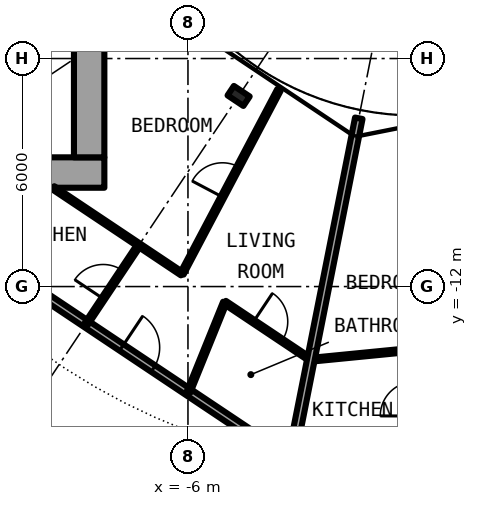
"""IFC4 building model, lengths in metres.
Left out: names, types, materials, properties, quantities, classifications, styles, units other than length and angle.
Written with IfcOpenShell. Run it as: python <this file> out.ifc"""

import sys

from ifc_helpers import new_model, si_unit, direction, frame, frame_2d, origin, origin_2d, place, context, subcontext, project, spatial, rectangle, i_section, extrude, element, fill, save


model = new_model("IFC4")
c1 = context("Model", 3, precision=1e-05, world=origin(), true_north=direction((0.0, 1.0)))
c2 = subcontext(c1, "Body", "Model", "MODEL_VIEW")
j1 = project(units=[si_unit("LENGTHUNIT", "METRE"), si_unit("PLANEANGLEUNIT", "RADIAN")], contexts=[c1])
p1 = place(None, origin())
s1 = spatial("IfcSite", under=j1, at=p1, CompositionType="ELEMENT")
p2 = place(p1, origin())
s2 = spatial("IfcBuilding", under=s1, at=p2, CompositionType="ELEMENT")
p3 = place(p2, frame((0.0, 0.0, 35.0)))
s3 = spatial("IfcBuildingStorey", under=s2, at=p3, CompositionType="ELEMENT", Elevation=35.0)
p4 = place(p3, frame((-4.667, -6.984, 0.0), z_axis=(0.0, 0.0, 1.0), x_axis=(-0.55557023302, -0.831469612303, 0.0)))
e1 = element("IfcColumn", 1, at=p4, inside=s3, PredefinedType="COLUMN", context=c2, shape_type="SweptSolid", body=[
    extrude(i_section(OverallWidth=0.3, OverallDepth=0.5, WebThickness=0.014, FlangeThickness=0.028, FilletRadius=0.027, at=origin_2d()), origin(), (0.0, 0.0, 1.0), 3.05),
])
p5 = place(p3, frame((-22.4, -9.0, 0.0), z_axis=(0.0, 0.0, 1.0), x_axis=(1.0, 0.0, 0.0)))
e2 = element("IfcWall", 2, at=p5, inside=s3, PredefinedType="SHEAR", context=c2, shape_type="SweptSolid", body=[
    extrude(rectangle(XDim=14.2, YDim=0.8, at=frame_2d((7.1, 0.0))), origin(), (0.0, 0.0, 1.0), 3.05),
])
p6 = place(p5, frame((1.325, 0.0, 0.0)))
e3 = element("IfcOpeningElement", 3, at=p6, cuts=e2, PredefinedType="OPENING", context=c2, shape_type="SweptSolid", body=[
    extrude(rectangle(XDim=1.2, YDim=2.3, at=frame_2d((0.6, 1.15))), frame((0.0, 0.41, 0.0), z_axis=(0.0, -1.0, 0.0), x_axis=(1.0, 0.0, 0.0)), (0.0, 0.0, 1.0), 0.82),
])
p7 = place(p3, frame((-8.6, 8.6, 0.0), z_axis=(0.0, 0.0, 1.0), x_axis=(0.0, -1.0, 0.0)))
e4 = element("IfcWall", 4, at=p7, inside=s3, PredefinedType="SHEAR", context=c2, shape_type="SweptSolid", body=[
    extrude(rectangle(XDim=17.2, YDim=0.8, at=frame_2d((8.6, 0.0))), origin(), (0.0, 0.0, 1.0), 3.05),
])
p8 = place(p7, frame((7.4, 0.0, 0.1)))
e5 = element("IfcOpeningElement", 5, at=p8, cuts=e4, PredefinedType="OPENING", context=c2, shape_type="SweptSolid", body=[
    extrude(rectangle(XDim=2.4, YDim=2.2, at=frame_2d((1.2, 1.1))), frame((0.0, 0.41, 0.0), z_axis=(0.0, -1.0, 0.0), x_axis=(1.0, 0.0, 0.0)), (0.0, 0.0, 1.0), 0.82),
])
p9 = place(p3, frame((-16.173, -10.99, 0.0), z_axis=(0.0, 0.0, 1.0), x_axis=(0.772704887747, -0.634765434198, 0.0)))
e6 = element("IfcWall", 6, at=p9, inside=s3, PredefinedType="PARTITIONING", context=c2, shape_type="SweptSolid", body=[
    extrude(rectangle(XDim=11.209, YDim=0.2, at=frame_2d((5.604, 0.0))), origin(), (0.0, 0.0, 1.0), 2.38),
])
p10 = place(p9, frame((3.137, 0.0, 0.0)))
e7 = element("IfcOpeningElement", 7, at=p10, cuts=e6, PredefinedType="OPENING", context=c2, shape_type="SweptSolid", body=[
    extrude(rectangle(XDim=1.0, YDim=2.3, at=frame_2d((0.5, 1.15))), frame((0.0, 0.11, 0.0), z_axis=(0.0, -1.0, 0.0), x_axis=(1.0, 0.0, 0.0)), (0.0, 0.0, 1.0), 0.22),
])
p11 = place(p3, frame((-3.297, -16.575, 0.0), z_axis=(0.0, 0.0, 1.0), x_axis=(0.995201860711, 0.097843019361, 0.0)))
e8 = element("IfcWall", 8, at=p11, inside=s3, PredefinedType="PARTITIONING", context=c2, shape_type="SweptSolid", body=[
    extrude(rectangle(XDim=9.811, YDim=0.2, at=frame_2d((4.906, 0.0))), origin(), (0.0, 0.0, 1.0), 2.7),
])
p12 = place(p11, frame((4.406, 0.0, 0.0)))
e9 = element("IfcOpeningElement", 9, at=p12, cuts=e8, PredefinedType="OPENING", context=c2, shape_type="SweptSolid", body=[
    extrude(rectangle(XDim=1.0, YDim=2.3, at=frame_2d((0.5, 1.15))), frame((0.0, 0.11, 0.0), z_axis=(0.0, -1.0, 0.0), x_axis=(1.0, 0.0, 0.0)), (0.0, 0.0, 1.0), 0.22),
])
p13 = place(p3, frame((-14.036, -9.402, 0.0), z_axis=(0.0, 0.0, 1.0), x_axis=(0.831561346449, -0.555432918625, 0.0)))
e10 = element("IfcWall", 10, at=p13, inside=s3, PredefinedType="PARTITIONING", context=c2, shape_type="SweptSolid", body=[
    extrude(rectangle(XDim=12.914, YDim=0.2, at=frame_2d((6.457, 0.0))), origin(), (0.0, 0.0, 1.0), 2.7),
])
p14 = place(p13, frame((7.566, 0.0, 0.0)))
e11 = element("IfcOpeningElement", 11, at=p14, cuts=e10, PredefinedType="OPENING", context=c2, shape_type="SweptSolid", body=[
    extrude(rectangle(XDim=1.0, YDim=2.3, at=frame_2d((0.5, 1.15))), frame((0.0, 0.11, 0.0), z_axis=(0.0, -1.0, 0.0), x_axis=(1.0, 0.0, 0.0)), (0.0, 0.0, 1.0), 0.22),
])
p15 = place(p3, frame((-2.772, -13.927, 0.0), z_axis=(0.0, 0.0, 1.0), x_axis=(0.995206960104, 0.097791137432, 0.0)))
e12 = element("IfcWall", 12, at=p15, inside=s3, PredefinedType="PARTITIONING", context=c2, shape_type="SweptSolid", body=[
    extrude(rectangle(XDim=4.122, YDim=0.1, at=frame_2d((2.061, 0.0))), origin(), (0.0, 0.0, 1.0), 2.7),
])
p16 = place(p3, frame((-9.545, -9.401, 0.0), z_axis=(0.0, 0.0, 1.0), x_axis=(0.831459707426, -0.555585056429, 0.0)))
e13 = element("IfcWall", 13, at=p16, inside=s3, PredefinedType="PARTITIONING", context=c2, shape_type="SweptSolid", body=[
    extrude(rectangle(XDim=4.073, YDim=0.1, at=frame_2d((2.037, 0.0))), origin(), (0.0, 0.0, 1.0), 2.7),
])
p17 = place(p3, frame((-5.029, -12.418, 0.0), z_axis=(0.0, 0.0, 1.0), x_axis=(0.831538390496, -0.555467285384, 0.0)))
e14 = element("IfcWall", 14, at=p17, inside=s3, PredefinedType="PARTITIONING", context=c2, shape_type="SweptSolid", body=[
    extrude(rectangle(XDim=2.717, YDim=0.1, at=frame_2d((1.358, 0.0))), origin(), (0.0, 0.0, 1.0), 2.7),
])
p18 = place(p17, frame((0.908, 0.0, 0.0)))
e15 = element("IfcOpeningElement", 15, at=p18, cuts=e14, PredefinedType="OPENING", context=c2, shape_type="SweptSolid", body=[
    extrude(rectangle(XDim=0.9, YDim=2.3, at=frame_2d((0.45, 1.15))), frame((0.0, 0.06, 0.0), z_axis=(0.0, -1.0, 0.0), x_axis=(1.0, 0.0, 0.0)), (0.0, 0.0, 1.0), 0.12),
])
p19 = place(p3, frame((-8.674, -12.982, 0.0), z_axis=(0.0, 0.0, 1.0), x_axis=(0.555355163998, 0.831613276602, 0.0)))
e16 = element("IfcWall", 16, at=p19, inside=s3, PredefinedType="PARTITIONING", context=c2, shape_type="SweptSolid", body=[
    extrude(rectangle(XDim=2.494, YDim=0.1, at=frame_2d((1.247, 0.0))), origin(), (0.0, 0.0, 1.0), 2.7),
])
p20 = place(p19, frame((0.797, 0.0, 0.0)))
e17 = element("IfcOpeningElement", 17, at=p20, cuts=e16, PredefinedType="OPENING", context=c2, shape_type="SweptSolid", body=[
    extrude(rectangle(XDim=0.9, YDim=2.3, at=frame_2d((0.45, 1.15))), frame((0.0, 0.06, 0.0), z_axis=(0.0, -1.0, 0.0), x_axis=(1.0, 0.0, 0.0)), (0.0, 0.0, 1.0), 0.12),
])
p21 = place(p3, frame((-6.159, -11.663, 0.0), z_axis=(0.0, 0.0, 1.0), x_axis=(0.466976820365, 0.884269556889, 0.0)))
e18 = element("IfcWall", 18, at=p21, inside=s3, PredefinedType="PARTITIONING", context=c2, shape_type="SweptSolid", body=[
    extrude(rectangle(XDim=5.469, YDim=0.1, at=frame_2d((2.735, 0.0))), origin(), (0.0, 0.0, 1.0), 2.7),
])
p22 = place(p21, frame((2.284, 0.0, 0.0)))
e19 = element("IfcOpeningElement", 19, at=p22, cuts=e18, PredefinedType="OPENING", context=c2, shape_type="SweptSolid", body=[
    extrude(rectangle(XDim=0.9, YDim=2.3, at=frame_2d((0.45, 1.15))), frame((0.0, 0.06, 0.0), z_axis=(0.0, -1.0, 0.0), x_axis=(1.0, 0.0, 0.0)), (0.0, 0.0, 1.0), 0.12),
])
p23 = place(p3, frame((-5.986, -14.779, 0.0), z_axis=(0.0, 0.0, 1.0), x_axis=(0.375649498413, 0.926761811008, 0.0)))
e20 = element("IfcWall", 20, at=p23, inside=s3, PredefinedType="PARTITIONING", context=c2, shape_type="SweptSolid", body=[
    extrude(rectangle(XDim=2.548, YDim=0.1, at=frame_2d((1.274, 0.0))), origin(), (0.0, 0.0, 1.0), 2.7),
])
p24 = place(p3, frame((-3.292, -16.576, 0.0), z_axis=(0.0, 0.0, 1.0), x_axis=(0.194683825545, 0.980866050015, 0.0)))
e21 = element("IfcWall", 21, at=p24, inside=s3, PredefinedType="PARTITIONING", context=c2, shape_type="SweptSolid", body=[
    extrude(rectangle(XDim=9.179, YDim=0.2, at=frame_2d((4.59, 0.0))), origin(), (0.0, 0.0, 1.0), 2.7),
])
p25 = place(p14, origin())
e22 = element("IfcDoor", 22, at=p25, inside=s3, OperationType="SINGLE_SWING_RIGHT", PredefinedType="DOOR", context=c2, shape_type="SweptSolid", body=[
    extrude(rectangle(XDim=1.0, YDim=2.3, at=frame_2d((0.5, 1.15))), frame((0.0, 0.025, 0.0), z_axis=(0.0, -1.0, 0.0), x_axis=(1.0, 0.0, 0.0)), (0.0, 0.0, 1.0), 0.05),
])
fill(e11, e22)
p26 = place(p18, origin())
e23 = element("IfcDoor", 23, at=p26, inside=s3, OperationType="SINGLE_SWING_LEFT", PredefinedType="DOOR", context=c2, shape_type="SweptSolid", body=[
    extrude(rectangle(XDim=0.9, YDim=2.3, at=frame_2d((0.45, 1.15))), frame((0.0, 0.025, 0.0), z_axis=(0.0, -1.0, 0.0), x_axis=(1.0, 0.0, 0.0)), (0.0, 0.0, 1.0), 0.05),
])
fill(e15, e23)
p27 = place(p20, origin())
e24 = element("IfcDoor", 24, at=p27, inside=s3, OperationType="SINGLE_SWING_RIGHT", PredefinedType="DOOR", context=c2, shape_type="SweptSolid", body=[
    extrude(rectangle(XDim=0.9, YDim=2.3, at=frame_2d((0.45, 1.15))), frame((0.0, 0.025, 0.0), z_axis=(0.0, -1.0, 0.0), x_axis=(1.0, 0.0, 0.0)), (0.0, 0.0, 1.0), 0.05),
])
fill(e17, e24)
p28 = place(p22, origin())
e25 = element("IfcDoor", 25, at=p28, inside=s3, OperationType="SINGLE_SWING_LEFT", PredefinedType="DOOR", context=c2, shape_type="SweptSolid", body=[
    extrude(rectangle(XDim=0.9, YDim=2.3, at=frame_2d((0.45, 1.15))), frame((0.0, 0.025, 0.0), z_axis=(0.0, -1.0, 0.0), x_axis=(1.0, 0.0, 0.0)), (0.0, 0.0, 1.0), 0.05),
])
fill(e19, e25)
save(model, sys.argv[1])
